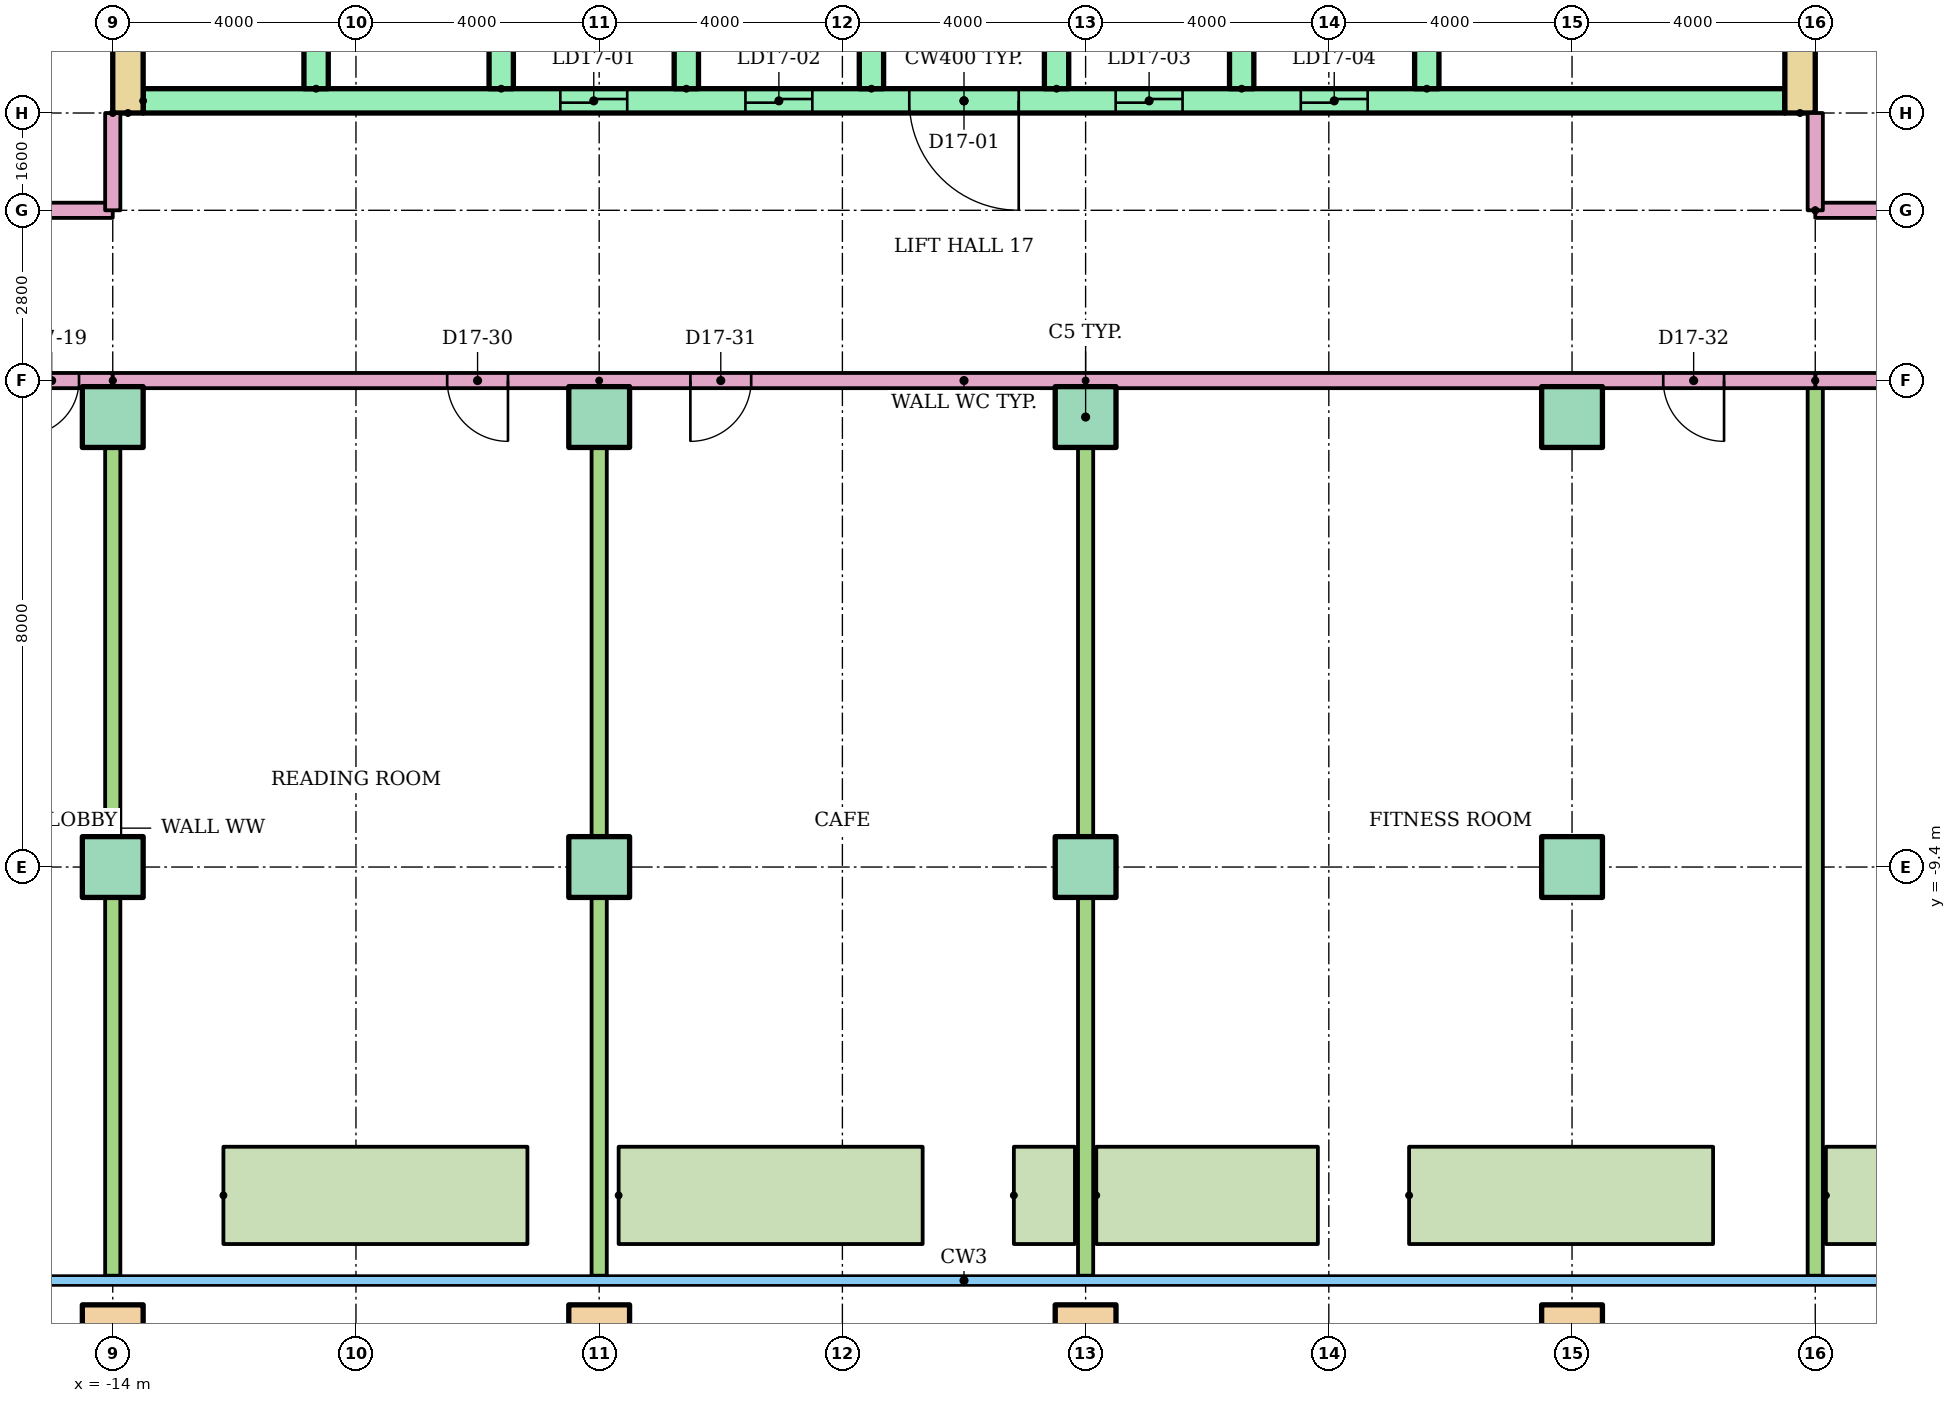
"""IFC4 building model, lengths in metres.
Left out: names, types, materials, properties, quantities, classifications, styles, units other than length and angle.
Written with IfcOpenShell. Run it as: python <this file> out.ifc"""

import sys

from ifc_helpers import new_model, si_unit, direction, frame, frame_2d, origin, origin_2d, place, context, subcontext, project, spatial, rectangle, hollow_rectangle, extrude, element, fill, save


model = new_model("IFC4")
c1 = context("Model", 3, precision=1e-05, world=origin(), true_north=direction((0.0, 1.0)))
c2 = subcontext(c1, "Body", "Model", "MODEL_VIEW")
j1 = project(units=[si_unit("LENGTHUNIT", "METRE"), si_unit("PLANEANGLEUNIT", "RADIAN")], contexts=[c1])
p1 = place(None, origin())
s1 = spatial("IfcSite", under=j1, at=p1, CompositionType="ELEMENT")
p2 = place(p1, origin())
s2 = spatial("IfcBuilding", under=s1, at=p2, CompositionType="ELEMENT")
p3 = place(p2, frame((0.0, 0.0, 64.0)))
s3 = spatial("IfcBuildingStorey", under=s2, at=p3, CompositionType="ELEMENT", Elevation=64.0)
for number, where in (
    (1, (-14.0, -17.1, 0.0)),
    (2, (-6.0, -17.1, 0.0)),
    (3, (2.0, -17.1, 0.0)),
    (4, (10.0, -17.1, 0.0)),
):
    element("IfcColumn", number, at=place(p3, frame(where)), inside=s3, PredefinedType="COLUMN", context=c2, shape_type="SweptSolid", body=[
        extrude(hollow_rectangle(XDim=1.0, YDim=1.0, WallThickness=0.05, at=origin_2d()), origin(), (0.0, 0.0, 1.0), 9.6),
    ])
for number, where in (
    (5, (-14.0, -9.4, 0.0)),
    (6, (-6.0, -9.4, 0.0)),
    (7, (2.0, -9.4, 0.0)),
    (8, (10.0, -9.4, 0.0)),
    (9, (-14.0, -2.0, 0.0)),
    (10, (-6.0, -2.0, 0.0)),
    (11, (2.0, -2.0, 0.0)),
    (12, (10.0, -2.0, 0.0)),
):
    element("IfcColumn", number, at=place(p3, frame(where)), inside=s3, PredefinedType="COLUMN", context=c2, shape_type="SweptSolid", body=[
        extrude(rectangle(XDim=1.0, YDim=1.0, at=origin_2d()), origin(), (0.0, 0.0, 1.0), 9.6),
    ])
for number, where in (
    (13, (-12.18, -14.8, 0.0)),
    (14, (-5.68, -14.8, 0.0)),
    (15, (7.32, -14.8, 0.0)),
):
    element("IfcWall", number, at=place(p3, frame(where)), inside=s3, PredefinedType="STANDARD", context=c2, shape_type="SweptSolid", body=[
        extrude(rectangle(XDim=5.0, YDim=1.6, at=frame_2d((2.5, 0.0))), origin(), (0.0, 0.0, 1.0), 0.8),
    ])
for number, where, z_axis, x_axis in (
    (16, (-13.75, 3.0, 0.0), (0.0, 0.0, 1.0), (0.0, 1.0, 0.0)),
    (17, (13.75, 3.0, 0.0), (0.0, 0.0, 1.0), (0.0, 1.0, 0.0)),
):
    element("IfcWall", number, at=place(p3, frame(where, z_axis=z_axis, x_axis=x_axis)), inside=s3, PredefinedType="SHEAR", context=c2, shape_type="SweptSolid", body=[
        extrude(rectangle(XDim=17.0, YDim=0.5, at=frame_2d((8.5, 0.0))), origin(), (0.0, 0.0, 1.0), 8.8),
    ])
p4 = place(p3, frame((-13.5, 3.2, 0.0)))
e18 = element("IfcWall", 18, at=p4, inside=s3, PredefinedType="SHEAR", context=c2, shape_type="SweptSolid", body=[
    extrude(rectangle(XDim=27.0, YDim=0.4, at=frame_2d((13.5, 0.0))), origin(), (0.0, 0.0, 1.0), 8.8),
])
p5 = place(p4, frame((6.861, 0.0, 0.0)))
e19 = element("IfcOpeningElement", 19, at=p5, cuts=e18, PredefinedType="OPENING", context=c2, shape_type="SweptSolid", body=[
    extrude(rectangle(XDim=1.1, YDim=2.1, at=frame_2d((0.55, 1.05))), frame((0.0, 0.21, 0.0), z_axis=(0.0, -1.0, 0.0), x_axis=(1.0, 0.0, 0.0)), (0.0, 0.0, 1.0), 0.42),
])
p6 = place(p4, frame((9.906, 0.0, 0.0)))
e20 = element("IfcOpeningElement", 20, at=p6, cuts=e18, PredefinedType="OPENING", context=c2, shape_type="SweptSolid", body=[
    extrude(rectangle(XDim=1.1, YDim=2.1, at=frame_2d((0.55, 1.05))), frame((0.0, 0.21, 0.0), z_axis=(0.0, -1.0, 0.0), x_axis=(1.0, 0.0, 0.0)), (0.0, 0.0, 1.0), 0.42),
])
p7 = place(p4, frame((15.994, 0.0, 0.0)))
e21 = element("IfcOpeningElement", 21, at=p7, cuts=e18, PredefinedType="OPENING", context=c2, shape_type="SweptSolid", body=[
    extrude(rectangle(XDim=1.1, YDim=2.1, at=frame_2d((0.55, 1.05))), frame((0.0, 0.21, 0.0), z_axis=(0.0, -1.0, 0.0), x_axis=(1.0, 0.0, 0.0)), (0.0, 0.0, 1.0), 0.42),
])
p8 = place(p4, frame((19.039, 0.0, 0.0)))
e22 = element("IfcOpeningElement", 22, at=p8, cuts=e18, PredefinedType="OPENING", context=c2, shape_type="SweptSolid", body=[
    extrude(rectangle(XDim=1.1, YDim=2.1, at=frame_2d((0.55, 1.05))), frame((0.0, 0.21, 0.0), z_axis=(0.0, -1.0, 0.0), x_axis=(1.0, 0.0, 0.0)), (0.0, 0.0, 1.0), 0.42),
])
p9 = place(p4, frame((12.6, 0.0, 0.0)))
e23 = element("IfcOpeningElement", 23, at=p9, cuts=e18, PredefinedType="OPENING", context=c2, shape_type="SweptSolid", body=[
    extrude(rectangle(XDim=1.8, YDim=2.1, at=frame_2d((0.9, 1.05))), frame((0.0, 0.21, 0.0), z_axis=(0.0, -1.0, 0.0), x_axis=(1.0, 0.0, 0.0)), (0.0, 0.0, 1.0), 0.42),
])
for number, where, z_axis, x_axis in (
    (24, (-10.656, 3.4, 0.0), (0.0, 0.0, 1.0), (0.0, 1.0, 0.0)),
    (25, (-7.611, 3.4, 0.0), (0.0, 0.0, 1.0), (0.0, 1.0, 0.0)),
    (26, (-4.567, 3.4, 0.0), (0.0, 0.0, 1.0), (0.0, 1.0, 0.0)),
    (27, (-1.522, 3.4, 0.0), (0.0, 0.0, 1.0), (0.0, 1.0, 0.0)),
    (28, (1.522, 3.4, 0.0), (0.0, 0.0, 1.0), (0.0, 1.0, 0.0)),
    (29, (4.567, 3.4, 0.0), (0.0, 0.0, 1.0), (0.0, 1.0, 0.0)),
    (30, (7.611, 3.4, 0.0), (0.0, 0.0, 1.0), (0.0, 1.0, 0.0)),
):
    element("IfcWall", number, at=place(p3, frame(where, z_axis=z_axis, x_axis=x_axis)), inside=s3, PredefinedType="SHEAR", context=c2, shape_type="SweptSolid", body=[
        extrude(rectangle(XDim=3.0, YDim=0.4, at=frame_2d((1.5, 0.0))), origin(), (0.0, 0.0, 1.0), 8.8),
    ])
p10 = place(p3, frame((-14.0, -1.4, 0.0), z_axis=(0.0, 0.0, 1.0), x_axis=(-1.0, 0.0, 0.0)))
e31 = element("IfcWall", 31, at=p10, inside=s3, PredefinedType="PARTITIONING", context=c2, shape_type="SweptSolid", body=[
    extrude(rectangle(XDim=15.0, YDim=0.25, at=frame_2d((7.5, 0.0))), origin(), (0.0, 0.0, 1.0), 8.8),
])
p11 = place(p10, frame((0.555, 0.0, 0.0)))
e32 = element("IfcOpeningElement", 32, at=p11, cuts=e31, PredefinedType="OPENING", context=c2, shape_type="SweptSolid", body=[
    extrude(rectangle(XDim=0.9, YDim=2.1, at=frame_2d((0.45, 1.05))), frame((0.0, 0.135, 0.0), z_axis=(0.0, -1.0, 0.0), x_axis=(1.0, 0.0, 0.0)), (0.0, 0.0, 1.0), 0.27),
])
p12 = place(p10, frame((9.5, 0.0, 0.0)))
e33 = element("IfcOpeningElement", 33, at=p12, cuts=e31, PredefinedType="OPENING", context=c2, shape_type="SweptSolid", body=[
    extrude(rectangle(XDim=1.0, YDim=2.1, at=frame_2d((0.5, 1.05))), frame((0.0, 0.135, 0.0), z_axis=(0.0, -1.0, 0.0), x_axis=(1.0, 0.0, 0.0)), (0.0, 0.0, 1.0), 0.27),
])
p13 = place(p10, frame((13.5, 0.0, 0.0)))
e34 = element("IfcOpeningElement", 34, at=p13, cuts=e31, PredefinedType="OPENING", context=c2, shape_type="SweptSolid", body=[
    extrude(rectangle(XDim=1.0, YDim=2.1, at=frame_2d((0.5, 1.05))), frame((0.0, 0.135, 0.0), z_axis=(0.0, -1.0, 0.0), x_axis=(1.0, 0.0, 0.0)), (0.0, 0.0, 1.0), 0.27),
])
p14 = place(p3, frame((-14.0, -1.4, 0.0), z_axis=(0.0, 0.0, 1.0), x_axis=(0.0, -1.0, 0.0)))
e35 = element("IfcWall", 35, at=p14, inside=s3, PredefinedType="PARTITIONING", context=c2, shape_type="SweptSolid", body=[
    extrude(rectangle(XDim=14.721, YDim=0.25, at=frame_2d((7.361, 0.0))), origin(), (0.0, 0.0, 1.0), 8.8),
])
p15 = place(p3, frame((-29.0, 1.4, 0.0)))
e36 = element("IfcWall", 36, at=p15, inside=s3, PredefinedType="PARTITIONING", context=c2, shape_type="SweptSolid", body=[
    extrude(rectangle(XDim=15.0, YDim=0.25, at=frame_2d((7.5, 0.0))), origin(), (0.0, 0.0, 1.0), 8.8),
])
p16 = place(p15, frame((12.5, 0.0, 0.0)))
e37 = element("IfcOpeningElement", 37, at=p16, cuts=e36, PredefinedType="OPENING", context=c2, shape_type="SweptSolid", body=[
    extrude(rectangle(XDim=1.0, YDim=2.1, at=frame_2d((0.5, 1.05))), frame((0.0, 0.135, 0.0), z_axis=(0.0, -1.0, 0.0), x_axis=(1.0, 0.0, 0.0)), (0.0, 0.0, 1.0), 0.27),
])
p17 = place(p15, frame((4.5, 0.0, 0.0)))
e38 = element("IfcOpeningElement", 38, at=p17, cuts=e36, PredefinedType="OPENING", context=c2, shape_type="SweptSolid", body=[
    extrude(rectangle(XDim=1.0, YDim=2.1, at=frame_2d((0.5, 1.05))), frame((0.0, 0.135, 0.0), z_axis=(0.0, -1.0, 0.0), x_axis=(1.0, 0.0, 0.0)), (0.0, 0.0, 1.0), 0.27),
])
p18 = place(p3, frame((29.0, -1.4, 0.0), z_axis=(0.0, 0.0, 1.0), x_axis=(-1.0, 0.0, 0.0)))
e39 = element("IfcWall", 39, at=p18, inside=s3, PredefinedType="PARTITIONING", context=c2, shape_type="SweptSolid", body=[
    extrude(rectangle(XDim=15.0, YDim=0.25, at=frame_2d((7.5, 0.0))), origin(), (0.0, 0.0, 1.0), 8.8),
])
p19 = place(p18, frame((12.5, 0.0, 0.0)))
e40 = element("IfcOpeningElement", 40, at=p19, cuts=e39, PredefinedType="OPENING", context=c2, shape_type="SweptSolid", body=[
    extrude(rectangle(XDim=1.0, YDim=2.1, at=frame_2d((0.5, 1.05))), frame((0.0, 0.135, 0.0), z_axis=(0.0, -1.0, 0.0), x_axis=(1.0, 0.0, 0.0)), (0.0, 0.0, 1.0), 0.27),
])
p20 = place(p18, frame((0.5, 0.0, 0.0)))
e41 = element("IfcOpeningElement", 41, at=p20, cuts=e39, PredefinedType="OPENING", context=c2, shape_type="SweptSolid", body=[
    extrude(rectangle(XDim=1.0, YDim=2.1, at=frame_2d((0.5, 1.05))), frame((0.0, 0.135, 0.0), z_axis=(0.0, -1.0, 0.0), x_axis=(1.0, 0.0, 0.0)), (0.0, 0.0, 1.0), 0.27),
])
p21 = place(p3, frame((14.0, -1.4, 0.0), z_axis=(0.0, 0.0, 1.0), x_axis=(0.0, -1.0, 0.0)))
e42 = element("IfcWall", 42, at=p21, inside=s3, PredefinedType="PARTITIONING", context=c2, shape_type="SweptSolid", body=[
    extrude(rectangle(XDim=14.721, YDim=0.25, at=frame_2d((7.361, 0.0))), origin(), (0.0, 0.0, 1.0), 8.8),
])
p22 = place(p3, frame((14.0, 1.4, 0.0)))
e43 = element("IfcWall", 43, at=p22, inside=s3, PredefinedType="PARTITIONING", context=c2, shape_type="SweptSolid", body=[
    extrude(rectangle(XDim=15.0, YDim=0.25, at=frame_2d((7.5, 0.0))), origin(), (0.0, 0.0, 1.0), 8.8),
])
p23 = place(p22, frame((1.5, 0.0, 0.0)))
e44 = element("IfcOpeningElement", 44, at=p23, cuts=e43, PredefinedType="OPENING", context=c2, shape_type="SweptSolid", body=[
    extrude(rectangle(XDim=1.0, YDim=2.1, at=frame_2d((0.5, 1.05))), frame((0.0, 0.135, 0.0), z_axis=(0.0, -1.0, 0.0), x_axis=(1.0, 0.0, 0.0)), (0.0, 0.0, 1.0), 0.27),
])
p24 = place(p22, frame((9.5, 0.0, 0.0)))
e45 = element("IfcOpeningElement", 45, at=p24, cuts=e43, PredefinedType="OPENING", context=c2, shape_type="SweptSolid", body=[
    extrude(rectangle(XDim=1.0, YDim=2.1, at=frame_2d((0.5, 1.05))), frame((0.0, 0.135, 0.0), z_axis=(0.0, -1.0, 0.0), x_axis=(1.0, 0.0, 0.0)), (0.0, 0.0, 1.0), 0.27),
])
for number, where, z_axis, x_axis in (
    (46, (-6.0, -1.4, 0.0), (0.0, 0.0, 1.0), (0.0, -1.0, 0.0)),
    (47, (2.0, -1.4, 0.0), (0.0, 0.0, 1.0), (0.0, -1.0, 0.0)),
):
    element("IfcWall", number, at=place(p3, frame(where, z_axis=z_axis, x_axis=x_axis)), inside=s3, PredefinedType="PARTITIONING", context=c2, shape_type="SweptSolid", body=[
        extrude(rectangle(XDim=14.721, YDim=0.25, at=frame_2d((7.361, 0.0))), origin(), (0.0, 0.0, 1.0), 8.8),
    ])
p25 = place(p3, frame((14.0, -1.4, 0.0), z_axis=(0.0, 0.0, 1.0), x_axis=(-1.0, 0.0, 0.0)))
e48 = element("IfcWall", 48, at=p25, inside=s3, PredefinedType="PARTITIONING", context=c2, shape_type="SweptSolid", body=[
    extrude(rectangle(XDim=28.0, YDim=0.25, at=frame_2d((14.0, 0.0))), origin(), (0.0, 0.0, 1.0), 8.8),
])
p26 = place(p25, frame((21.5, 0.0, 0.0)))
e49 = element("IfcOpeningElement", 49, at=p26, cuts=e48, PredefinedType="OPENING", context=c2, shape_type="SweptSolid", body=[
    extrude(rectangle(XDim=1.0, YDim=2.1, at=frame_2d((0.5, 1.05))), frame((0.0, 0.135, 0.0), z_axis=(0.0, -1.0, 0.0), x_axis=(1.0, 0.0, 0.0)), (0.0, 0.0, 1.0), 0.27),
])
p27 = place(p25, frame((17.5, 0.0, 0.0)))
e50 = element("IfcOpeningElement", 50, at=p27, cuts=e48, PredefinedType="OPENING", context=c2, shape_type="SweptSolid", body=[
    extrude(rectangle(XDim=1.0, YDim=2.1, at=frame_2d((0.5, 1.05))), frame((0.0, 0.135, 0.0), z_axis=(0.0, -1.0, 0.0), x_axis=(1.0, 0.0, 0.0)), (0.0, 0.0, 1.0), 0.27),
])
p28 = place(p25, frame((1.5, 0.0, 0.0)))
e51 = element("IfcOpeningElement", 51, at=p28, cuts=e48, PredefinedType="OPENING", context=c2, shape_type="SweptSolid", body=[
    extrude(rectangle(XDim=1.0, YDim=2.1, at=frame_2d((0.5, 1.05))), frame((0.0, 0.135, 0.0), z_axis=(0.0, -1.0, 0.0), x_axis=(1.0, 0.0, 0.0)), (0.0, 0.0, 1.0), 0.27),
])
for number, where, z_axis, x_axis in (
    (52, (-14.0, 3.0, 0.0), (0.0, 0.0, 1.0), (0.0, -1.0, 0.0)),
    (53, (14.0, 1.4, 0.0), (0.0, 0.0, 1.0), (0.0, 1.0, 0.0)),
):
    element("IfcWall", number, at=place(p3, frame(where, z_axis=z_axis, x_axis=x_axis)), inside=s3, PredefinedType="PARTITIONING", context=c2, shape_type="SweptSolid", body=[
        extrude(rectangle(XDim=1.6, YDim=0.25, at=frame_2d((0.8, 0.0))), origin(), (0.0, 0.0, 1.0), 8.8),
    ])
p29 = place(p3, frame((0.82, -14.8, 0.0)))
e54 = element("IfcWall", 54, at=p29, inside=s3, PredefinedType="STANDARD", context=c2, shape_type="SweptSolid", body=[
    extrude(rectangle(XDim=1.005, YDim=1.6, at=frame_2d((0.502, 0.0))), origin(), (0.0, 0.0, 1.0), 0.8),
])
p30 = place(p3, frame((2.175, -14.8, 0.0)))
e55 = element("IfcWall", 55, at=p30, inside=s3, PredefinedType="STANDARD", context=c2, shape_type="SweptSolid", body=[
    extrude(rectangle(XDim=3.645, YDim=1.6, at=frame_2d((1.823, 0.0))), origin(), (0.0, 0.0, 1.0), 0.8),
])
p31 = place(p3, frame((14.175, -14.8, 0.0)))
e56 = element("IfcWall", 56, at=p31, inside=s3, PredefinedType="STANDARD", context=c2, shape_type="SweptSolid", body=[
    extrude(rectangle(XDim=4.645, YDim=1.6, at=frame_2d((2.323, 0.0))), origin(), (0.0, 0.0, 1.0), 0.8),
])
p32 = place(p5, origin())
e57 = element("IfcDoor", 57, at=p32, inside=s3, OperationType="SLIDING_TO_LEFT", PredefinedType="DOOR", context=c2, shape_type="SweptSolid", body=[
    extrude(rectangle(XDim=1.1, YDim=2.1, at=frame_2d((0.55, 1.05))), frame((0.0, 0.025, 0.0), z_axis=(0.0, -1.0, 0.0), x_axis=(1.0, 0.0, 0.0)), (0.0, 0.0, 1.0), 0.05),
])
fill(e19, e57)
p33 = place(p6, origin())
e58 = element("IfcDoor", 58, at=p33, inside=s3, OperationType="SLIDING_TO_LEFT", PredefinedType="DOOR", context=c2, shape_type="SweptSolid", body=[
    extrude(rectangle(XDim=1.1, YDim=2.1, at=frame_2d((0.55, 1.05))), frame((0.0, 0.025, 0.0), z_axis=(0.0, -1.0, 0.0), x_axis=(1.0, 0.0, 0.0)), (0.0, 0.0, 1.0), 0.05),
])
fill(e20, e58)
p34 = place(p7, origin())
e59 = element("IfcDoor", 59, at=p34, inside=s3, OperationType="SLIDING_TO_LEFT", PredefinedType="DOOR", context=c2, shape_type="SweptSolid", body=[
    extrude(rectangle(XDim=1.1, YDim=2.1, at=frame_2d((0.55, 1.05))), frame((0.0, 0.025, 0.0), z_axis=(0.0, -1.0, 0.0), x_axis=(1.0, 0.0, 0.0)), (0.0, 0.0, 1.0), 0.05),
])
fill(e21, e59)
p35 = place(p8, origin())
e60 = element("IfcDoor", 60, at=p35, inside=s3, OperationType="SLIDING_TO_LEFT", PredefinedType="DOOR", context=c2, shape_type="SweptSolid", body=[
    extrude(rectangle(XDim=1.1, YDim=2.1, at=frame_2d((0.55, 1.05))), frame((0.0, 0.025, 0.0), z_axis=(0.0, -1.0, 0.0), x_axis=(1.0, 0.0, 0.0)), (0.0, 0.0, 1.0), 0.05),
])
fill(e22, e60)
p36 = place(p9, frame((1.8, 0.0, 0.0), z_axis=(0.0, 0.0, 1.0), x_axis=(-1.0, 0.0, 0.0)))
e61 = element("IfcDoor", 61, at=p36, inside=s3, OperationType="DOUBLE_DOOR_SINGLE_SWING", PredefinedType="DOOR", context=c2, shape_type="SweptSolid", body=[
    extrude(rectangle(XDim=1.8, YDim=2.1, at=frame_2d((0.9, 1.05))), frame((0.0, 0.025, 0.0), z_axis=(0.0, -1.0, 0.0), x_axis=(1.0, 0.0, 0.0)), (0.0, 0.0, 1.0), 0.05),
])
fill(e23, e61)
p37 = place(p11, origin())
e62 = element("IfcDoor", 62, at=p37, inside=s3, OperationType="SINGLE_SWING_RIGHT", PredefinedType="DOOR", context=c2, shape_type="SweptSolid", body=[
    extrude(rectangle(XDim=0.9, YDim=2.1, at=frame_2d((0.45, 1.05))), frame((0.0, 0.025, 0.0), z_axis=(0.0, -1.0, 0.0), x_axis=(1.0, 0.0, 0.0)), (0.0, 0.0, 1.0), 0.05),
])
fill(e32, e62)
p38 = place(p26, origin())
e63 = element("IfcDoor", 63, at=p38, inside=s3, OperationType="SINGLE_SWING_LEFT", PredefinedType="DOOR", context=c2, shape_type="SweptSolid", body=[
    extrude(rectangle(XDim=1.0, YDim=2.1, at=frame_2d((0.5, 1.05))), frame((0.0, 0.025, 0.0), z_axis=(0.0, -1.0, 0.0), x_axis=(1.0, 0.0, 0.0)), (0.0, 0.0, 1.0), 0.05),
])
fill(e49, e63)
p39 = place(p27, origin())
e64 = element("IfcDoor", 64, at=p39, inside=s3, OperationType="SINGLE_SWING_RIGHT", PredefinedType="DOOR", context=c2, shape_type="SweptSolid", body=[
    extrude(rectangle(XDim=1.0, YDim=2.1, at=frame_2d((0.5, 1.05))), frame((0.0, 0.025, 0.0), z_axis=(0.0, -1.0, 0.0), x_axis=(1.0, 0.0, 0.0)), (0.0, 0.0, 1.0), 0.05),
])
fill(e50, e64)
p40 = place(p28, origin())
e65 = element("IfcDoor", 65, at=p40, inside=s3, OperationType="SINGLE_SWING_LEFT", PredefinedType="DOOR", context=c2, shape_type="SweptSolid", body=[
    extrude(rectangle(XDim=1.0, YDim=2.1, at=frame_2d((0.5, 1.05))), frame((0.0, 0.025, 0.0), z_axis=(0.0, -1.0, 0.0), x_axis=(1.0, 0.0, 0.0)), (0.0, 0.0, 1.0), 0.05),
])
fill(e51, e65)
save(model, sys.argv[1])
